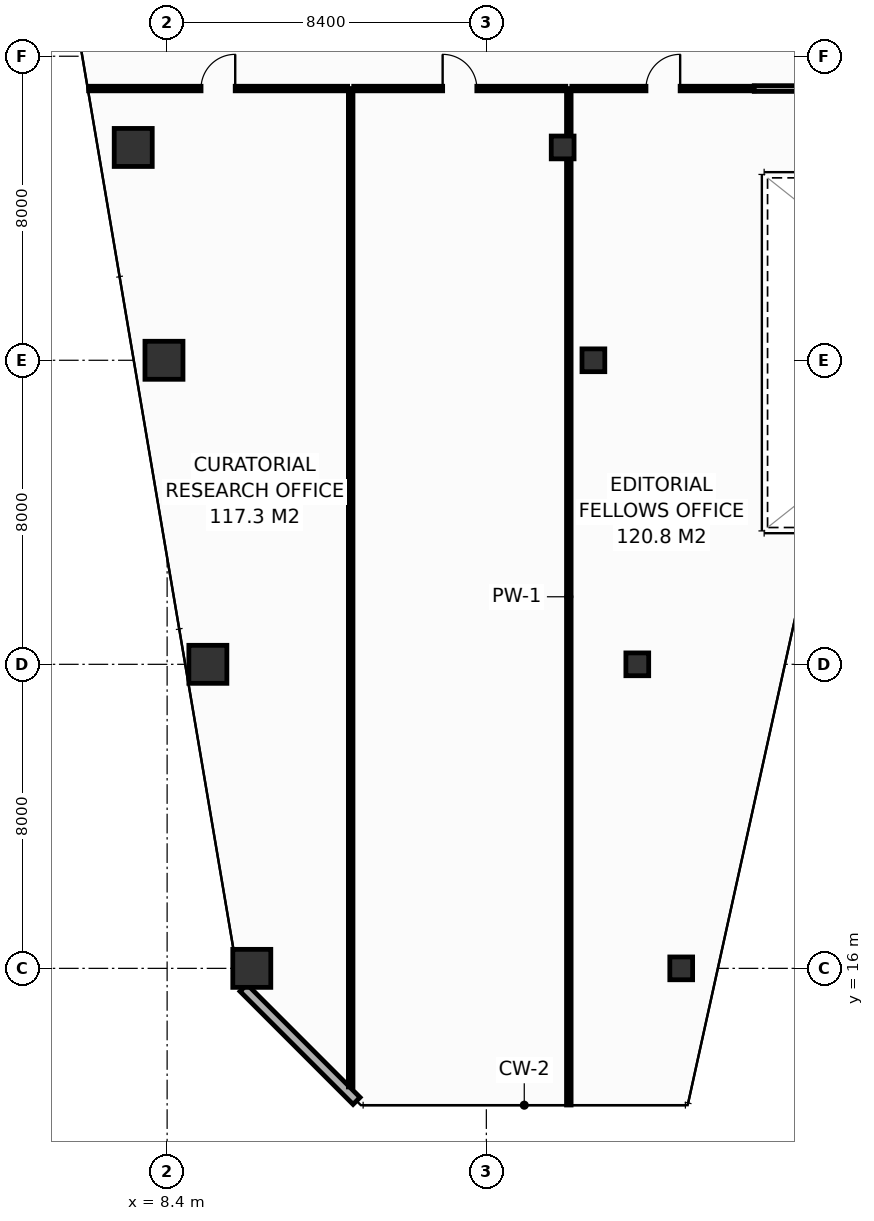
"""IFC4 building model, lengths in metres.
Left out: names, types, materials, properties, quantities, classifications, styles, units other than length and angle.
Written with IfcOpenShell. Run it as: python <this file> out.ifc"""

import sys

from ifc_helpers import new_model, si_unit, direction, frame, frame_2d, origin, origin_2d, place, context, subcontext, project, spatial, rectangle, hollow_rectangle, extrude, element, fill, save


model = new_model("IFC4")
c1 = context("Model", 3, precision=1e-05, world=origin(), true_north=direction((0.0, 1.0)))
c2 = subcontext(c1, "Body", "Model", "MODEL_VIEW")
j1 = project(units=[si_unit("LENGTHUNIT", "METRE"), si_unit("PLANEANGLEUNIT", "RADIAN")], contexts=[c1])
p1 = place(None, origin())
s1 = spatial("IfcSite", under=j1, at=p1, CompositionType="ELEMENT")
p2 = place(p1, origin())
s2 = spatial("IfcBuilding", under=s1, at=p2, CompositionType="ELEMENT")
p3 = place(p2, frame((0.0, 0.0, 179.0)))
s3 = spatial("IfcBuildingStorey", under=s2, at=p3, CompositionType="ELEMENT", Elevation=179.0)
p4 = place(p3, frame((10.628, 16.0, 0.0), z_axis=(0.0, 0.0, 1.0), x_axis=(1.0, 0.0, 0.0)))
e1 = element("IfcColumn", 1, at=p4, inside=s3, PredefinedType="COLUMN", context=c2, shape_type="SweptSolid", body=[
    extrude(hollow_rectangle(XDim=1.0, YDim=1.0, WallThickness=0.045, at=origin_2d()), origin(), (0.0, 0.0, 1.0), 3.8),
])
p5 = place(p3, frame((21.928, 16.0, 0.0), z_axis=(0.0, 0.0, 1.0), x_axis=(1.0, 0.0, 0.0)))
e2 = element("IfcColumn", 2, at=p5, inside=s3, PredefinedType="COLUMN", context=c2, shape_type="SweptSolid", body=[
    extrude(hollow_rectangle(XDim=0.6, YDim=0.6, WallThickness=0.028, at=origin_2d()), origin(), (0.0, 0.0, 1.0), 3.8),
])
p6 = place(p3, frame((9.472, 24.0, 0.0), z_axis=(0.0, 0.0, 1.0), x_axis=(1.0, 0.0, 0.0)))
e3 = element("IfcColumn", 3, at=p6, inside=s3, PredefinedType="COLUMN", context=c2, shape_type="SweptSolid", body=[
    extrude(hollow_rectangle(XDim=1.0, YDim=1.0, WallThickness=0.045, at=origin_2d()), origin(), (0.0, 0.0, 1.0), 3.8),
])
p7 = place(p3, frame((20.772, 24.0, 0.0), z_axis=(0.0, 0.0, 1.0), x_axis=(1.0, 0.0, 0.0)))
e4 = element("IfcColumn", 4, at=p7, inside=s3, PredefinedType="COLUMN", context=c2, shape_type="SweptSolid", body=[
    extrude(hollow_rectangle(XDim=0.6, YDim=0.6, WallThickness=0.028, at=origin_2d()), origin(), (0.0, 0.0, 1.0), 3.8),
])
p8 = place(p3, frame((8.317, 32.0, 0.0), z_axis=(0.0, 0.0, 1.0), x_axis=(1.0, 0.0, 0.0)))
e5 = element("IfcColumn", 5, at=p8, inside=s3, PredefinedType="COLUMN", context=c2, shape_type="SweptSolid", body=[
    extrude(hollow_rectangle(XDim=1.0, YDim=1.0, WallThickness=0.045, at=origin_2d()), origin(), (0.0, 0.0, 1.0), 3.8),
])
p9 = place(p3, frame((19.617, 32.0, 0.0), z_axis=(0.0, 0.0, 1.0), x_axis=(1.0, 0.0, 0.0)))
e6 = element("IfcColumn", 6, at=p9, inside=s3, PredefinedType="COLUMN", context=c2, shape_type="SweptSolid", body=[
    extrude(hollow_rectangle(XDim=0.6, YDim=0.6, WallThickness=0.028, at=origin_2d()), origin(), (0.0, 0.0, 1.0), 3.8),
])
p10 = place(p3, frame((7.508, 37.6, 0.0), z_axis=(0.0, 0.0, 1.0), x_axis=(1.0, 0.0, 0.0)))
e7 = element("IfcColumn", 7, at=p10, inside=s3, PredefinedType="COLUMN", context=c2, shape_type="SweptSolid", body=[
    extrude(hollow_rectangle(XDim=1.0, YDim=1.0, WallThickness=0.045, at=origin_2d()), origin(), (0.0, 0.0, 1.0), 3.8),
])
p11 = place(p3, frame((18.808, 37.6, 0.0), z_axis=(0.0, 0.0, 1.0), x_axis=(1.0, 0.0, 0.0)))
e8 = element("IfcColumn", 8, at=p11, inside=s3, PredefinedType="COLUMN", context=c2, shape_type="SweptSolid", body=[
    extrude(hollow_rectangle(XDim=0.6, YDim=0.6, WallThickness=0.028, at=origin_2d()), origin(), (0.0, 0.0, 1.0), 3.8),
])
p12 = place(p3, frame((10.411, 15.487, 0.0), z_axis=(0.0, 0.0, 1.0), x_axis=(0.707135806771, -0.70707775441, 0.0)))
e9 = element("IfcWall", 9, at=p12, inside=s3, PredefinedType="STANDARD", context=c2, shape_type="SweptSolid", body=[
    extrude(rectangle(XDim=4.206, YDim=0.26, at=frame_2d((2.103, 0.0))), origin(), (0.0, 0.0, 1.0), 3.55),
])
p13 = place(p3, frame((13.23, 12.88, 0.0), z_axis=(0.0, 0.0, 1.0), x_axis=(0.0, 1.0, 0.0)))
e10 = element("IfcWall", 10, at=p13, inside=s3, PredefinedType="PARTITIONING", context=c2, shape_type="SweptSolid", body=[
    extrude(rectangle(XDim=26.27, YDim=0.12, at=frame_2d((13.135, 0.0))), origin(), (0.0, 0.0, 1.0), 2.835),
])
p14 = place(p3, frame((18.97, 12.405, 0.0), z_axis=(0.0, 0.0, 1.0), x_axis=(0.0, 1.0, 0.0)))
e11 = element("IfcWall", 11, at=p14, inside=s3, PredefinedType="PARTITIONING", context=c2, shape_type="SweptSolid", body=[
    extrude(rectangle(XDim=26.745, YDim=0.12, at=frame_2d((13.373, 0.0))), origin(), (0.0, 0.0, 1.0), 2.835),
])
p15 = place(p3, frame((6.334, 39.15, 0.0), z_axis=(0.0, 0.0, 1.0), x_axis=(1.0, 0.0, 0.0)))
e12 = element("IfcWall", 12, at=p15, inside=s3, PredefinedType="PARTITIONING", context=c2, shape_type="SweptSolid", body=[
    extrude(rectangle(XDim=6.816, YDim=0.12, at=frame_2d((3.408, 0.0))), origin(), (0.0, 0.0, 1.0), 3.035),
])
p16 = place(p15, frame((2.958, 0.0, 0.0)))
e13 = element("IfcOpeningElement", 13, at=p16, cuts=e12, PredefinedType="OPENING", context=c2, shape_type="SweptSolid", body=[
    extrude(rectangle(XDim=0.9, YDim=2.1, at=frame_2d((0.45, 1.05))), frame((0.0, 0.07, 0.0), z_axis=(0.0, -1.0, 0.0), x_axis=(1.0, 0.0, 0.0)), (0.0, 0.0, 1.0), 0.14),
])
p17 = place(p3, frame((13.31, 39.15, 0.0), z_axis=(0.0, 0.0, 1.0), x_axis=(1.0, 0.0, 0.0)))
e14 = element("IfcWall", 14, at=p17, inside=s3, PredefinedType="PARTITIONING", context=c2, shape_type="SweptSolid", body=[
    extrude(rectangle(XDim=5.58, YDim=0.12, at=frame_2d((2.79, 0.0))), origin(), (0.0, 0.0, 1.0), 3.55),
])
p18 = place(p17, frame((2.34, 0.0, 0.0)))
e15 = element("IfcOpeningElement", 15, at=p18, cuts=e14, PredefinedType="OPENING", context=c2, shape_type="SweptSolid", body=[
    extrude(rectangle(XDim=0.9, YDim=2.1, at=frame_2d((0.45, 1.05))), frame((0.0, 0.07, 0.0), z_axis=(0.0, -1.0, 0.0), x_axis=(1.0, 0.0, 0.0)), (0.0, 0.0, 1.0), 0.14),
])
p19 = place(p3, frame((19.05, 39.15, 0.0), z_axis=(0.0, 0.0, 1.0), x_axis=(1.0, 0.0, 0.0)))
e16 = element("IfcWall", 16, at=p19, inside=s3, PredefinedType="PARTITIONING", context=c2, shape_type="SweptSolid", body=[
    extrude(rectangle(XDim=4.8, YDim=0.12, at=frame_2d((2.4, 0.0))), origin(), (0.0, 0.0, 1.0), 2.835),
])
p20 = place(p19, frame((1.95, 0.0, 0.0)))
e17 = element("IfcOpeningElement", 17, at=p20, cuts=e16, PredefinedType="OPENING", context=c2, shape_type="SweptSolid", body=[
    extrude(rectangle(XDim=0.9, YDim=2.1, at=frame_2d((0.45, 1.05))), frame((0.0, 0.07, 0.0), z_axis=(0.0, -1.0, 0.0), x_axis=(1.0, 0.0, 0.0)), (0.0, 0.0, 1.0), 0.14),
])
p21 = place(p3, frame((23.85, 39.15, 0.0), z_axis=(0.0, 0.0, 1.0), x_axis=(1.0, 0.0, 0.0)))
e18 = element("IfcWall", 18, at=p21, inside=s3, PredefinedType="PARTITIONING", context=c2, shape_type="SweptSolid", body=[
    extrude(rectangle(XDim=12.3, YDim=0.15, at=frame_2d((6.15, 0.0))), origin(), (0.0, 0.0, 1.0), 3.55),
])
p22 = place(p16, origin())
e19 = element("IfcDoor", 19, at=p22, inside=s3, OperationType="SINGLE_SWING_RIGHT", PredefinedType="DOOR", context=c2, shape_type="SweptSolid", body=[
    extrude(rectangle(XDim=0.9, YDim=2.1, at=frame_2d((0.45, 1.05))), frame((0.0, 0.025, 0.0), z_axis=(0.0, -1.0, 0.0), x_axis=(1.0, 0.0, 0.0)), (0.0, 0.0, 1.0), 0.05),
])
fill(e13, e19)
p23 = place(p18, origin())
e20 = element("IfcDoor", 20, at=p23, inside=s3, OperationType="SINGLE_SWING_LEFT", PredefinedType="DOOR", context=c2, shape_type="SweptSolid", body=[
    extrude(rectangle(XDim=0.9, YDim=2.1, at=frame_2d((0.45, 1.05))), frame((0.0, 0.025, 0.0), z_axis=(0.0, -1.0, 0.0), x_axis=(1.0, 0.0, 0.0)), (0.0, 0.0, 1.0), 0.05),
])
fill(e15, e20)
p24 = place(p20, origin())
e21 = element("IfcDoor", 21, at=p24, inside=s3, OperationType="SINGLE_SWING_RIGHT", PredefinedType="DOOR", context=c2, shape_type="SweptSolid", body=[
    extrude(rectangle(XDim=0.9, YDim=2.1, at=frame_2d((0.45, 1.05))), frame((0.0, 0.025, 0.0), z_axis=(0.0, -1.0, 0.0), x_axis=(1.0, 0.0, 0.0)), (0.0, 0.0, 1.0), 0.05),
])
fill(e17, e21)
save(model, sys.argv[1])
